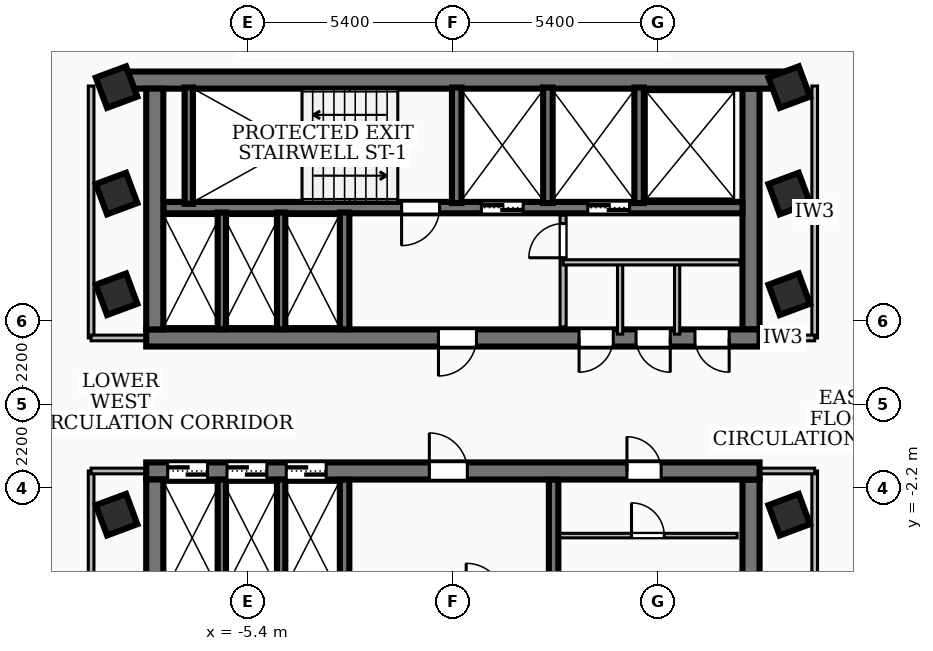
"""IFC4 building model, lengths in metres.
Left out: names, types, materials, properties, quantities, classifications, styles, units other than length and angle.
Written with IfcOpenShell. Run it as: python <this file> out.ifc"""

import sys

from ifc_helpers import new_model, si_unit, direction, frame, frame_2d, origin, origin_2d, place, context, subcontext, project, spatial, rectangle, extrude, element, fill, save


model = new_model("IFC4")
c1 = context("Model", 3, precision=1e-05, world=origin(), true_north=direction((0.0, 1.0)))
c2 = subcontext(c1, "Body", "Model", "MODEL_VIEW")
j1 = project(units=[si_unit("LENGTHUNIT", "METRE"), si_unit("PLANEANGLEUNIT", "RADIAN")], contexts=[c1])
p1 = place(None, origin())
s1 = spatial("IfcSite", under=j1, at=p1, CompositionType="ELEMENT")
p2 = place(p1, origin())
s2 = spatial("IfcBuilding", under=s1, at=p2, CompositionType="ELEMENT")
p3 = place(p2, frame((0.0, 0.0, 170.28)))
s3 = spatial("IfcBuildingStorey", under=s2, at=p3, CompositionType="ELEMENT", Elevation=170.28)
p4 = place(p3, frame((-8.78, 8.535, 0.0), z_axis=(0.0, 0.0, 1.0), x_axis=(1.0, 0.0, 0.0)))
e1 = element("IfcWall", 1, at=p4, inside=s3, PredefinedType="SHEAR", context=c2, shape_type="SweptSolid", body=[
    extrude(rectangle(XDim=17.56, YDim=0.45, at=frame_2d((8.78, 0.0))), origin(), (0.0, 0.0, 1.0), 3.34),
])
p5 = place(p3, frame((8.07, 1.75, 0.0), z_axis=(0.0, 0.0, 1.0), x_axis=(-1.0, 0.0, 0.0)))
e2 = element("IfcWall", 2, at=p5, inside=s3, PredefinedType="SHEAR", context=c2, shape_type="SweptSolid", body=[
    extrude(rectangle(XDim=16.14, YDim=0.45, at=frame_2d((8.07, 0.0))), origin(), (0.0, 0.0, 1.0), 3.34),
])
p6 = place(p5, frame((7.45, 0.0, 0.0)))
e3 = element("IfcOpeningElement", 3, at=p6, cuts=e2, PredefinedType="OPENING", context=c2, shape_type="SweptSolid", body=[
    extrude(rectangle(XDim=1.0, YDim=2.1, at=frame_2d((0.5, 1.05))), frame((0.0, 0.235, 0.0), z_axis=(0.0, -1.0, 0.0), x_axis=(1.0, 0.0, 0.0)), (0.0, 0.0, 1.0), 0.47),
])
p7 = place(p5, frame((3.85, 0.0, 0.0)))
e4 = element("IfcOpeningElement", 4, at=p7, cuts=e2, PredefinedType="OPENING", context=c2, shape_type="SweptSolid", body=[
    extrude(rectangle(XDim=0.9, YDim=2.06, at=frame_2d((0.45, 1.03))), frame((0.0, 0.235, 0.0), z_axis=(0.0, -1.0, 0.0), x_axis=(1.0, 0.0, 0.0)), (0.0, 0.0, 1.0), 0.47),
])
p8 = place(p5, frame((2.35, 0.0, 0.0)))
e5 = element("IfcOpeningElement", 5, at=p8, cuts=e2, PredefinedType="OPENING", context=c2, shape_type="SweptSolid", body=[
    extrude(rectangle(XDim=0.9, YDim=2.06, at=frame_2d((0.45, 1.03))), frame((0.0, 0.235, 0.0), z_axis=(0.0, -1.0, 0.0), x_axis=(1.0, 0.0, 0.0)), (0.0, 0.0, 1.0), 0.47),
])
p9 = place(p5, frame((0.8, 0.0, 0.0)))
e6 = element("IfcOpeningElement", 6, at=p9, cuts=e2, PredefinedType="OPENING", context=c2, shape_type="SweptSolid", body=[
    extrude(rectangle(XDim=0.9, YDim=2.06, at=frame_2d((0.45, 1.03))), frame((0.0, 0.235, 0.0), z_axis=(0.0, -1.0, 0.0), x_axis=(1.0, 0.0, 0.0)), (0.0, 0.0, 1.0), 0.47),
])
for number, where, z_axis, x_axis in (
    (7, (-7.845, 1.975, 0.0), (0.0, 0.0, 1.0), (0.0, 1.0, 0.0)),
    (8, (7.845, 8.31, 0.0), (0.0, 0.0, 1.0), (0.0, -1.0, 0.0)),
):
    element("IfcWall", number, at=place(p3, frame(where, z_axis=z_axis, x_axis=x_axis)), inside=s3, PredefinedType="SHEAR", context=c2, shape_type="SweptSolid", body=[
        extrude(rectangle(XDim=6.335, YDim=0.45, at=frame_2d((3.167, 0.0))), origin(), (0.0, 0.0, 1.0), 3.34),
    ])
p10 = place(p3, frame((7.62, 5.18, 0.0), z_axis=(0.0, 0.0, 1.0), x_axis=(-1.0, 0.0, 0.0)))
e9 = element("IfcWall", 9, at=p10, inside=s3, PredefinedType="SOLIDWALL", context=c2, shape_type="SweptSolid", body=[
    extrude(rectangle(XDim=15.24, YDim=0.3, at=frame_2d((7.62, 0.0))), origin(), (0.0, 0.0, 1.0), 3.34),
])
p11 = place(p10, frame((5.77, 0.0, 0.0)))
e10 = element("IfcOpeningElement", 10, at=p11, cuts=e9, PredefinedType="OPENING", context=c2, shape_type="SweptSolid", body=[
    extrude(rectangle(XDim=1.1, YDim=2.15, at=frame_2d((0.55, 1.075))), frame((0.0, 0.16, 0.0), z_axis=(0.0, -1.0, 0.0), x_axis=(1.0, 0.0, 0.0)), (0.0, 0.0, 1.0), 0.32),
])
p12 = place(p10, frame((2.97, 0.0, 0.0)))
e11 = element("IfcOpeningElement", 11, at=p12, cuts=e9, PredefinedType="OPENING", context=c2, shape_type="SweptSolid", body=[
    extrude(rectangle(XDim=1.1, YDim=2.15, at=frame_2d((0.55, 1.075))), frame((0.0, 0.16, 0.0), z_axis=(0.0, -1.0, 0.0), x_axis=(1.0, 0.0, 0.0)), (0.0, 0.0, 1.0), 0.32),
])
p13 = place(p10, frame((7.97, 0.0, 0.0)))
e12 = element("IfcOpeningElement", 12, at=p13, cuts=e9, PredefinedType="OPENING", context=c2, shape_type="SweptSolid", body=[
    extrude(rectangle(XDim=1.0, YDim=2.1, at=frame_2d((0.5, 1.05))), frame((0.0, 0.16, 0.0), z_axis=(0.0, -1.0, 0.0), x_axis=(1.0, 0.0, 0.0)), (0.0, 0.0, 1.0), 0.32),
])
p14 = place(p3, frame((-8.07, -1.75, 0.0), z_axis=(0.0, 0.0, 1.0), x_axis=(1.0, 0.0, 0.0)))
e13 = element("IfcWall", 13, at=p14, inside=s3, PredefinedType="SHEAR", context=c2, shape_type="SweptSolid", body=[
    extrude(rectangle(XDim=16.14, YDim=0.45, at=frame_2d((8.07, 0.0))), origin(), (0.0, 0.0, 1.0), 3.34),
])
p15 = place(p14, frame((7.45, 0.0, 0.0)))
e14 = element("IfcOpeningElement", 14, at=p15, cuts=e13, PredefinedType="OPENING", context=c2, shape_type="SweptSolid", body=[
    extrude(rectangle(XDim=1.0, YDim=2.1, at=frame_2d((0.5, 1.05))), frame((0.0, 0.235, 0.0), z_axis=(0.0, -1.0, 0.0), x_axis=(1.0, 0.0, 0.0)), (0.0, 0.0, 1.0), 0.47),
])
p16 = place(p14, frame((12.65, 0.0, 0.0)))
e15 = element("IfcOpeningElement", 15, at=p16, cuts=e13, PredefinedType="OPENING", context=c2, shape_type="SweptSolid", body=[
    extrude(rectangle(XDim=0.9, YDim=2.06, at=frame_2d((0.45, 1.03))), frame((0.0, 0.235, 0.0), z_axis=(0.0, -1.0, 0.0), x_axis=(1.0, 0.0, 0.0)), (0.0, 0.0, 1.0), 0.47),
])
p17 = place(p14, frame((0.565, 0.0, 0.0)))
e16 = element("IfcOpeningElement", 16, at=p17, cuts=e13, PredefinedType="OPENING", context=c2, shape_type="SweptSolid", body=[
    extrude(rectangle(XDim=1.05, YDim=2.15, at=frame_2d((0.525, 1.075))), frame((0.0, 0.235, 0.0), z_axis=(0.0, -1.0, 0.0), x_axis=(1.0, 0.0, 0.0)), (0.0, 0.0, 1.0), 0.47),
])
p18 = place(p14, frame((2.125, 0.0, 0.0)))
e17 = element("IfcOpeningElement", 17, at=p18, cuts=e13, PredefinedType="OPENING", context=c2, shape_type="SweptSolid", body=[
    extrude(rectangle(XDim=1.05, YDim=2.15, at=frame_2d((0.525, 1.075))), frame((0.0, 0.235, 0.0), z_axis=(0.0, -1.0, 0.0), x_axis=(1.0, 0.0, 0.0)), (0.0, 0.0, 1.0), 0.47),
])
p19 = place(p14, frame((3.685, 0.0, 0.0)))
e18 = element("IfcOpeningElement", 18, at=p19, cuts=e13, PredefinedType="OPENING", context=c2, shape_type="SweptSolid", body=[
    extrude(rectangle(XDim=1.05, YDim=2.15, at=frame_2d((0.525, 1.075))), frame((0.0, 0.235, 0.0), z_axis=(0.0, -1.0, 0.0), x_axis=(1.0, 0.0, 0.0)), (0.0, 0.0, 1.0), 0.47),
])
for number, where, z_axis, x_axis in (
    (19, (-7.845, -8.31, 0.0), (0.0, 0.0, 1.0), (0.0, 1.0, 0.0)),
    (20, (7.845, -1.975, 0.0), (0.0, 0.0, 1.0), (0.0, -1.0, 0.0)),
):
    element("IfcWall", number, at=place(p3, frame(where, z_axis=z_axis, x_axis=x_axis)), inside=s3, PredefinedType="SHEAR", context=c2, shape_type="SweptSolid", body=[
        extrude(rectangle(XDim=6.335, YDim=0.45, at=frame_2d((3.167, 0.0))), origin(), (0.0, 0.0, 1.0), 3.34),
    ])
p20 = place(p3, frame((-6.95, 5.28, 0.0), z_axis=(0.0, 0.0, 1.0), x_axis=(0.0, 1.0, 0.0)))
e21 = element("IfcWall", 21, at=p20, inside=s3, PredefinedType="SOLIDWALL", context=c2, shape_type="SweptSolid", body=[
    extrude(rectangle(XDim=3.06, YDim=0.22, at=frame_2d((1.53, 0.0))), origin(), (0.0, 0.0, 1.0), 3.34),
])
for number, where, z_axis, x_axis in (
    (22, (0.1, 5.3, 0.0), (0.0, 0.0, 1.0), (0.0, 1.0, 0.0)),
    (23, (2.5, 5.3, 0.0), (0.0, 0.0, 1.0), (0.0, 1.0, 0.0)),
    (24, (4.9, 5.3, 0.0), (0.0, 0.0, 1.0), (0.0, 1.0, 0.0)),
):
    element("IfcWall", number, at=place(p3, frame(where, z_axis=z_axis, x_axis=x_axis)), inside=s3, PredefinedType="SOLIDWALL", context=c2, shape_type="SweptSolid", body=[
        extrude(rectangle(XDim=3.04, YDim=0.25, at=frame_2d((1.52, 0.0))), origin(), (0.0, 0.0, 1.0), 3.34),
    ])
for number, where, z_axis, x_axis in (
    (25, (-2.85, 1.98, 0.0), (0.0, 0.0, 1.0), (0.0, 1.0, 0.0)),
    (26, (-2.85, -5.05, 0.0), (0.0, 0.0, 1.0), (0.0, 1.0, 0.0)),
    (27, (2.65, -5.05, 0.0), (0.0, 0.0, 1.0), (0.0, 1.0, 0.0)),
):
    element("IfcWall", number, at=place(p3, frame(where, z_axis=z_axis, x_axis=x_axis)), inside=s3, PredefinedType="SOLIDWALL", context=c2, shape_type="SweptSolid", body=[
        extrude(rectangle(XDim=3.07, YDim=0.25, at=frame_2d((1.535, 0.0))), origin(), (0.0, 0.0, 1.0), 3.34),
    ])
for number, where, z_axis, x_axis in (
    (28, (-6.08, 1.98, 0.0), (0.0, 0.0, 1.0), (0.0, 1.0, 0.0)),
    (29, (-4.52, 1.98, 0.0), (0.0, 0.0, 1.0), (0.0, 1.0, 0.0)),
    (30, (-6.08, -5.05, 0.0), (0.0, 0.0, 1.0), (0.0, 1.0, 0.0)),
    (31, (-4.52, -5.05, 0.0), (0.0, 0.0, 1.0), (0.0, 1.0, 0.0)),
):
    element("IfcWall", number, at=place(p3, frame(where, z_axis=z_axis, x_axis=x_axis)), inside=s3, PredefinedType="SOLIDWALL", context=c2, shape_type="SweptSolid", body=[
        extrude(rectangle(XDim=3.07, YDim=0.22, at=frame_2d((1.535, 0.0))), origin(), (0.0, 0.0, 1.0), 3.34),
    ])
for number, where, z_axis, x_axis in (
    (32, (-8.85, -2.9, 0.0), (0.0, 0.0, 1.0), (0.937, 0.349, 0.0)),
    (33, (-8.85, 2.9, 0.0), (0.0, 0.0, 1.0), (0.937, 0.349, 0.0)),
    (34, (-8.85, 5.55, 0.0), (0.0, 0.0, 1.0), (0.937, 0.349, 0.0)),
    (35, (8.85, -2.9, 0.0), (0.0, 0.0, 1.0), (0.937, 0.349, 0.0)),
    (36, (8.85, 2.9, 0.0), (0.0, 0.0, 1.0), (0.937, 0.349, 0.0)),
    (37, (8.85, 5.55, 0.0), (0.0, 0.0, 1.0), (0.937, 0.349, 0.0)),
    (38, (-8.85, 8.35, 0.0), (0.0, 0.0, 1.0), (0.937, 0.349, 0.0)),
    (39, (8.85, 8.35, 0.0), (0.0, 0.0, 1.0), (0.937, 0.349, 0.0)),
):
    element("IfcColumn", number, at=place(p3, frame(where, z_axis=z_axis, x_axis=x_axis)), inside=s3, PredefinedType="COLUMN", context=c2, shape_type="SweptSolid", body=[
        extrude(rectangle(XDim=0.85, YDim=0.85, at=origin_2d()), origin(), (0.0, 0.0, 1.0), 3.6),
    ])
p21 = place(p3, frame((2.9, 2.04, 0.0), z_axis=(0.0, 0.0, 1.0), x_axis=(0.0, 1.0, 0.0)))
e40 = element("IfcWall", 40, at=p21, inside=s3, PredefinedType="PARTITIONING", context=c2, shape_type="SweptSolid", body=[
    extrude(rectangle(XDim=2.94, YDim=0.16, at=frame_2d((1.47, 0.0))), origin(), (0.0, 0.0, 1.0), 2.57),
])
p22 = place(p21, frame((1.82, 0.0, 0.0)))
e41 = element("IfcOpeningElement", 41, at=p22, cuts=e40, PredefinedType="OPENING", context=c2, shape_type="SweptSolid", body=[
    extrude(rectangle(XDim=0.9, YDim=2.06, at=frame_2d((0.45, 1.03))), frame((0.0, 0.09, 0.0), z_axis=(0.0, -1.0, 0.0), x_axis=(1.0, 0.0, 0.0)), (0.0, 0.0, 1.0), 0.18),
])
p23 = place(p3, frame((2.9, 3.74, 0.0), z_axis=(0.0, 0.0, 1.0), x_axis=(1.0, 0.0, 0.0)))
e42 = element("IfcWall", 42, at=p23, inside=s3, PredefinedType="PARTITIONING", context=c2, shape_type="SweptSolid", body=[
    extrude(rectangle(XDim=4.65, YDim=0.138, at=frame_2d((2.325, 0.0))), origin(), (0.0, 0.0, 1.0), 3.34),
])
p24 = place(p3, frame((2.8, -3.45, 0.0), z_axis=(0.0, 0.0, 1.0), x_axis=(1.0, 0.0, 0.0)))
e43 = element("IfcWall", 43, at=p24, inside=s3, PredefinedType="PARTITIONING", context=c2, shape_type="SweptSolid", body=[
    extrude(rectangle(XDim=4.68, YDim=0.12, at=frame_2d((2.34, 0.0))), origin(), (0.0, 0.0, 1.0), 3.34),
])
p25 = place(p24, frame((1.9, 0.0, 0.0)))
e44 = element("IfcOpeningElement", 44, at=p25, cuts=e43, PredefinedType="OPENING", context=c2, shape_type="SweptSolid", body=[
    extrude(rectangle(XDim=0.86, YDim=2.04, at=frame_2d((0.43, 1.02))), frame((0.0, 0.07, 0.0), z_axis=(0.0, -1.0, 0.0), x_axis=(1.0, 0.0, 0.0)), (0.0, 0.0, 1.0), 0.14),
])
for number, where, z_axis, x_axis in (
    (45, (4.4, 1.85, 0.0), (0.0, 0.0, 1.0), (0.0, 1.0, 0.0)),
    (46, (5.9, 1.85, 0.0), (0.0, 0.0, 1.0), (0.0, 1.0, 0.0)),
):
    element("IfcWall", number, at=place(p3, frame(where, z_axis=z_axis, x_axis=x_axis)), inside=s3, PredefinedType="PARTITIONING", context=c2, shape_type="SweptSolid", body=[
        extrude(rectangle(XDim=1.89, YDim=0.138, at=frame_2d((0.945, 0.0))), origin(), (0.0, 0.0, 1.0), 2.57),
    ])
p26 = place(p3, frame((-9.52, 1.75, 0.0), z_axis=(0.0, 0.0, 1.0), x_axis=(0.0, 1.0, 0.0)))
e47 = element("IfcWall", 47, at=p26, inside=s3, PredefinedType="PARTITIONING", context=c2, shape_type="SweptSolid", body=[
    extrude(rectangle(XDim=6.63, YDim=0.15, at=frame_2d((3.315, 0.0))), origin(), (0.0, 0.0, 1.0), 3.34),
])
p27 = place(p3, frame((-7.85, 1.75, 0.0), z_axis=(0.0, 0.0, 1.0), x_axis=(-1.0, 0.0, 0.0)))
e48 = element("IfcWall", 48, at=p27, inside=s3, PredefinedType="PARTITIONING", context=c2, shape_type="SweptSolid", body=[
    extrude(rectangle(XDim=1.67, YDim=0.15, at=frame_2d((0.835, 0.0))), origin(), (0.0, 0.0, 1.0), 2.57),
])
p28 = place(p3, frame((-9.52, -8.38, 0.0), z_axis=(0.0, 0.0, 1.0), x_axis=(0.0, 1.0, 0.0)))
e49 = element("IfcWall", 49, at=p28, inside=s3, PredefinedType="PARTITIONING", context=c2, shape_type="SweptSolid", body=[
    extrude(rectangle(XDim=6.63, YDim=0.15, at=frame_2d((3.315, 0.0))), origin(), (0.0, 0.0, 1.0), 2.644),
])
p29 = place(p3, frame((-7.85, -1.75, 0.0), z_axis=(0.0, 0.0, 1.0), x_axis=(-1.0, 0.0, 0.0)))
e50 = element("IfcWall", 50, at=p29, inside=s3, PredefinedType="PARTITIONING", context=c2, shape_type="SweptSolid", body=[
    extrude(rectangle(XDim=1.67, YDim=0.15, at=frame_2d((0.835, 0.0))), origin(), (0.0, 0.0, 1.0), 2.57),
])
p30 = place(p3, frame((9.52, 1.75, 0.0), z_axis=(0.0, 0.0, 1.0), x_axis=(0.0, 1.0, 0.0)))
e51 = element("IfcWall", 51, at=p30, inside=s3, PredefinedType="PARTITIONING", context=c2, shape_type="SweptSolid", body=[
    extrude(rectangle(XDim=6.63, YDim=0.15, at=frame_2d((3.315, 0.0))), origin(), (0.0, 0.0, 1.0), 2.644),
])
p31 = place(p3, frame((7.85, 1.75, 0.0), z_axis=(0.0, 0.0, 1.0), x_axis=(1.0, 0.0, 0.0)))
e52 = element("IfcWall", 52, at=p31, inside=s3, PredefinedType="PARTITIONING", context=c2, shape_type="SweptSolid", body=[
    extrude(rectangle(XDim=1.67, YDim=0.15, at=frame_2d((0.835, 0.0))), origin(), (0.0, 0.0, 1.0), 2.57),
])
p32 = place(p3, frame((9.52, -8.38, 0.0), z_axis=(0.0, 0.0, 1.0), x_axis=(0.0, 1.0, 0.0)))
e53 = element("IfcWall", 53, at=p32, inside=s3, PredefinedType="PARTITIONING", context=c2, shape_type="SweptSolid", body=[
    extrude(rectangle(XDim=6.63, YDim=0.15, at=frame_2d((3.315, 0.0))), origin(), (0.0, 0.0, 1.0), 3.34),
])
p33 = place(p3, frame((7.85, -1.75, 0.0), z_axis=(0.0, 0.0, 1.0), x_axis=(1.0, 0.0, 0.0)))
e54 = element("IfcWall", 54, at=p33, inside=s3, PredefinedType="PARTITIONING", context=c2, shape_type="SweptSolid", body=[
    extrude(rectangle(XDim=1.67, YDim=0.15, at=frame_2d((0.835, 0.0))), origin(), (0.0, 0.0, 1.0), 2.57),
])
p34 = place(p3, frame((9.846, 14.522, 0.0), z_axis=(0.0, 0.0, 1.0), x_axis=(0.348543090668, -0.937292757866, 0.0)))
e55 = element("IfcWall", 55, at=p34, inside=s3, PredefinedType="PARTITIONING", context=c2, shape_type="SweptSolid", body=[
    extrude(rectangle(XDim=20.198, YDim=0.1, at=frame_2d((10.099, 0.0))), origin(), (0.0, 0.0, 1.0), 2.644),
])
p35 = place(p34, frame((9.579, 0.0, 0.0)))
e56 = element("IfcOpeningElement", 56, at=p35, cuts=e55, PredefinedType="OPENING", context=c2, shape_type="SweptSolid", body=[
    extrude(rectangle(XDim=1.2, YDim=2.1, at=frame_2d((0.6, 1.05))), frame((0.0, 0.06, 0.0), z_axis=(0.0, -1.0, 0.0), x_axis=(1.0, 0.0, 0.0)), (0.0, 0.0, 1.0), 0.12),
])
p36 = place(p3, frame((-9.846, -14.522, 0.0), z_axis=(0.0, 0.0, 1.0), x_axis=(-0.348543090668, 0.937292757866, 0.0)))
e57 = element("IfcWall", 57, at=p36, inside=s3, PredefinedType="PARTITIONING", context=c2, shape_type="SweptSolid", body=[
    extrude(rectangle(XDim=20.198, YDim=0.1, at=frame_2d((10.099, 0.0))), origin(), (0.0, 0.0, 1.0), 2.644),
])
p37 = place(p36, frame((9.579, 0.0, 0.0)))
e58 = element("IfcOpeningElement", 58, at=p37, cuts=e57, PredefinedType="OPENING", context=c2, shape_type="SweptSolid", body=[
    extrude(rectangle(XDim=1.2, YDim=2.1, at=frame_2d((0.6, 1.05))), frame((0.0, 0.06, 0.0), z_axis=(0.0, -1.0, 0.0), x_axis=(1.0, 0.0, 0.0)), (0.0, 0.0, 1.0), 0.12),
])
p38 = place(p6, origin())
e59 = element("IfcDoor", 59, at=p38, inside=s3, OperationType="SINGLE_SWING_RIGHT", PredefinedType="DOOR", context=c2, shape_type="SweptSolid", body=[
    extrude(rectangle(XDim=1.0, YDim=2.1, at=frame_2d((0.5, 1.05))), frame((0.0, 0.025, 0.0), z_axis=(0.0, -1.0, 0.0), x_axis=(1.0, 0.0, 0.0)), (0.0, 0.0, 1.0), 0.05),
])
fill(e3, e59)
p39 = place(p15, origin())
e60 = element("IfcDoor", 60, at=p39, inside=s3, OperationType="SINGLE_SWING_LEFT", PredefinedType="DOOR", context=c2, shape_type="SweptSolid", body=[
    extrude(rectangle(XDim=1.0, YDim=2.1, at=frame_2d((0.5, 1.05))), frame((0.0, 0.025, 0.0), z_axis=(0.0, -1.0, 0.0), x_axis=(1.0, 0.0, 0.0)), (0.0, 0.0, 1.0), 0.05),
])
fill(e14, e60)
p40 = place(p11, origin())
e61 = element("IfcDoor", 61, at=p40, inside=s3, OperationType="DOUBLE_DOOR_SLIDING", PredefinedType="DOOR", context=c2, shape_type="SweptSolid", body=[
    extrude(rectangle(XDim=1.1, YDim=2.15, at=frame_2d((0.55, 1.075))), frame((0.0, 0.025, 0.0), z_axis=(0.0, -1.0, 0.0), x_axis=(1.0, 0.0, 0.0)), (0.0, 0.0, 1.0), 0.05),
])
fill(e10, e61)
p41 = place(p12, origin())
e62 = element("IfcDoor", 62, at=p41, inside=s3, OperationType="DOUBLE_DOOR_SLIDING", PredefinedType="DOOR", context=c2, shape_type="SweptSolid", body=[
    extrude(rectangle(XDim=1.1, YDim=2.15, at=frame_2d((0.55, 1.075))), frame((0.0, 0.025, 0.0), z_axis=(0.0, -1.0, 0.0), x_axis=(1.0, 0.0, 0.0)), (0.0, 0.0, 1.0), 0.05),
])
fill(e11, e62)
p42 = place(p13, origin())
e63 = element("IfcDoor", 63, at=p42, inside=s3, OperationType="SINGLE_SWING_RIGHT", PredefinedType="DOOR", context=c2, shape_type="SweptSolid", body=[
    extrude(rectangle(XDim=1.0, YDim=2.1, at=frame_2d((0.5, 1.05))), frame((0.0, 0.025, 0.0), z_axis=(0.0, -1.0, 0.0), x_axis=(1.0, 0.0, 0.0)), (0.0, 0.0, 1.0), 0.05),
])
fill(e12, e63)
p43 = place(p16, origin())
e64 = element("IfcDoor", 64, at=p43, inside=s3, OperationType="SINGLE_SWING_LEFT", PredefinedType="DOOR", context=c2, shape_type="SweptSolid", body=[
    extrude(rectangle(XDim=0.9, YDim=2.06, at=frame_2d((0.45, 1.03))), frame((0.0, 0.025, 0.0), z_axis=(0.0, -1.0, 0.0), x_axis=(1.0, 0.0, 0.0)), (0.0, 0.0, 1.0), 0.05),
])
fill(e15, e64)
p44 = place(p17, origin())
e65 = element("IfcDoor", 65, at=p44, inside=s3, OperationType="DOUBLE_DOOR_SLIDING", PredefinedType="DOOR", context=c2, shape_type="SweptSolid", body=[
    extrude(rectangle(XDim=1.05, YDim=2.15, at=frame_2d((0.525, 1.075))), frame((0.0, 0.025, 0.0), z_axis=(0.0, -1.0, 0.0), x_axis=(1.0, 0.0, 0.0)), (0.0, 0.0, 1.0), 0.05),
])
fill(e16, e65)
p45 = place(p18, origin())
e66 = element("IfcDoor", 66, at=p45, inside=s3, OperationType="DOUBLE_DOOR_SLIDING", PredefinedType="DOOR", context=c2, shape_type="SweptSolid", body=[
    extrude(rectangle(XDim=1.05, YDim=2.15, at=frame_2d((0.525, 1.075))), frame((0.0, 0.025, 0.0), z_axis=(0.0, -1.0, 0.0), x_axis=(1.0, 0.0, 0.0)), (0.0, 0.0, 1.0), 0.05),
])
fill(e17, e66)
p46 = place(p19, origin())
e67 = element("IfcDoor", 67, at=p46, inside=s3, OperationType="DOUBLE_DOOR_SLIDING", PredefinedType="DOOR", context=c2, shape_type="SweptSolid", body=[
    extrude(rectangle(XDim=1.05, YDim=2.15, at=frame_2d((0.525, 1.075))), frame((0.0, 0.025, 0.0), z_axis=(0.0, -1.0, 0.0), x_axis=(1.0, 0.0, 0.0)), (0.0, 0.0, 1.0), 0.05),
])
fill(e18, e67)
p47 = place(p7, origin())
e68 = element("IfcDoor", 68, at=p47, inside=s3, OperationType="SINGLE_SWING_RIGHT", PredefinedType="DOOR", context=c2, shape_type="SweptSolid", body=[
    extrude(rectangle(XDim=0.9, YDim=2.06, at=frame_2d((0.45, 1.03))), frame((0.0, 0.025, 0.0), z_axis=(0.0, -1.0, 0.0), x_axis=(1.0, 0.0, 0.0)), (0.0, 0.0, 1.0), 0.05),
])
fill(e4, e68)
p48 = place(p8, origin())
e69 = element("IfcDoor", 69, at=p48, inside=s3, OperationType="SINGLE_SWING_LEFT", PredefinedType="DOOR", context=c2, shape_type="SweptSolid", body=[
    extrude(rectangle(XDim=0.9, YDim=2.06, at=frame_2d((0.45, 1.03))), frame((0.0, 0.025, 0.0), z_axis=(0.0, -1.0, 0.0), x_axis=(1.0, 0.0, 0.0)), (0.0, 0.0, 1.0), 0.05),
])
fill(e5, e69)
p49 = place(p9, origin())
e70 = element("IfcDoor", 70, at=p49, inside=s3, OperationType="SINGLE_SWING_LEFT", PredefinedType="DOOR", context=c2, shape_type="SweptSolid", body=[
    extrude(rectangle(XDim=0.9, YDim=2.06, at=frame_2d((0.45, 1.03))), frame((0.0, 0.025, 0.0), z_axis=(0.0, -1.0, 0.0), x_axis=(1.0, 0.0, 0.0)), (0.0, 0.0, 1.0), 0.05),
])
fill(e6, e70)
p50 = place(p22, origin())
e71 = element("IfcDoor", 71, at=p50, inside=s3, OperationType="SINGLE_SWING_LEFT", PredefinedType="DOOR", context=c2, shape_type="SweptSolid", body=[
    extrude(rectangle(XDim=0.9, YDim=2.06, at=frame_2d((0.45, 1.03))), frame((0.0, 0.025, 0.0), z_axis=(0.0, -1.0, 0.0), x_axis=(1.0, 0.0, 0.0)), (0.0, 0.0, 1.0), 0.05),
])
fill(e41, e71)
p51 = place(p25, origin())
e72 = element("IfcDoor", 72, at=p51, inside=s3, OperationType="SINGLE_SWING_LEFT", PredefinedType="DOOR", context=c2, shape_type="SweptSolid", body=[
    extrude(rectangle(XDim=0.86, YDim=2.04, at=frame_2d((0.43, 1.02))), frame((0.0, 0.025, 0.0), z_axis=(0.0, -1.0, 0.0), x_axis=(1.0, 0.0, 0.0)), (0.0, 0.0, 1.0), 0.05),
])
fill(e44, e72)
save(model, sys.argv[1])
